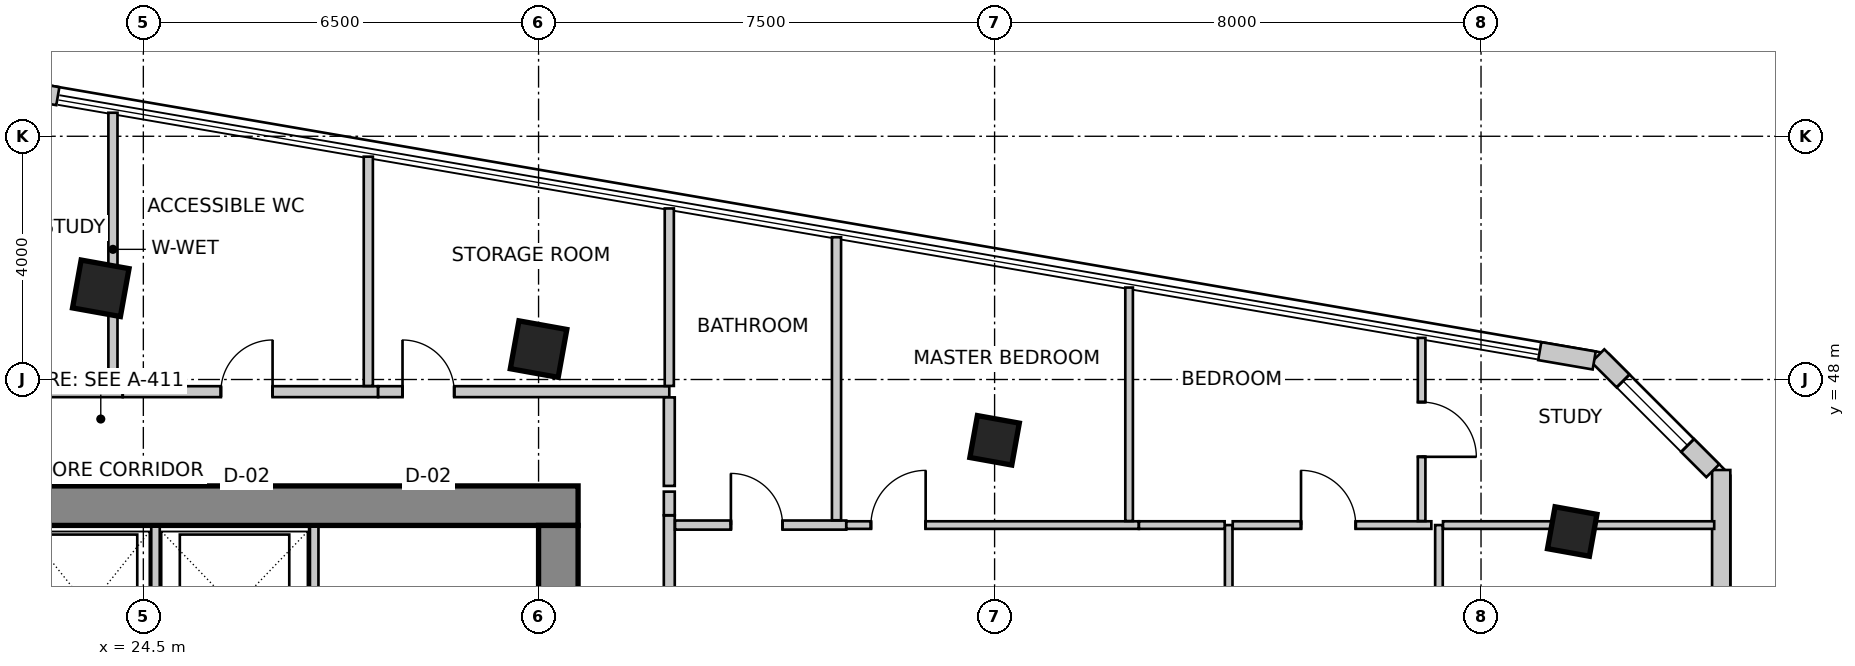
"""IFC4 building model, lengths in metres.
Left out: names, types, materials, properties, quantities, classifications, styles, units other than length and angle.
Written with IfcOpenShell. Run it as: python <this file> out.ifc"""

import sys

from ifc_helpers import new_model, si_unit, direction, frame, frame_2d, origin, origin_2d, place, context, subcontext, project, spatial, rectangle, extrude, source, transform, mapped, element, fill, save


model = new_model("IFC4")
c1 = context("Model", 3, precision=1e-05, world=origin(), true_north=direction((0.0, 1.0)))
c2 = subcontext(c1, "Body", "Model", "MODEL_VIEW")
j1 = project(units=[si_unit("LENGTHUNIT", "METRE"), si_unit("PLANEANGLEUNIT", "RADIAN")], contexts=[c1])
p1 = place(None, origin())
s1 = spatial("IfcSite", under=j1, at=p1, CompositionType="ELEMENT")
p2 = place(p1, origin())
s2 = spatial("IfcBuilding", under=s1, at=p2, CompositionType="ELEMENT")
p3 = place(p2, frame((0.0, 0.0, 186.9)))
s3 = spatial("IfcBuildingStorey", under=s2, at=p3, CompositionType="ELEMENT", Elevation=186.9)
p4 = place(p3, frame((15.95, 45.925, 0.0), z_axis=(0.0, 0.0, 1.0), x_axis=(1.0, 0.0, 0.0)))
e1 = element("IfcWall", 1, at=p4, inside=s3, PredefinedType="SHEAR", context=c2, shape_type="SweptSolid", body=[
    extrude(rectangle(XDim=15.7, YDim=0.65, at=frame_2d((7.85, 0.0))), origin(), (0.0, 0.0, 1.0), 3.5),
])
p5 = place(p3, frame((31.325, 34.2, 0.0), z_axis=(0.0, 0.0, 1.0), x_axis=(0.0, 1.0, 0.0)))
e2 = element("IfcWall", 2, at=p5, inside=s3, PredefinedType="SHEAR", context=c2, shape_type="SweptSolid", body=[
    extrude(rectangle(XDim=11.4, YDim=0.65, at=frame_2d((5.7, 0.0))), origin(), (0.0, 0.0, 1.0), 3.5),
])
m1 = source(origin(), c2, "Body", "SweptSolid", [
    extrude(rectangle(XDim=1.1, YDim=2.15, at=frame_2d((0.55, 1.075))), frame((0.0, 0.335, 0.0), z_axis=(0.0, -1.0, 0.0), x_axis=(1.0, 0.0, 0.0)), (0.0, 0.0, 1.0), 0.67),
])
p6 = place(p5, frame((7.35, 0.0, 0.0)))
e3 = element("IfcOpeningElement", 3, at=p6, cuts=e2, PredefinedType="OPENING", context=c2, shape_type="MappedRepresentation", body=[
    mapped(m1, transform((0.0, 0.0, 0.0), scale=1.0)),
])
m2 = source(origin(), c2, "Body", "SweptSolid", [
    extrude(rectangle(XDim=0.8, YDim=0.8, at=origin_2d()), origin(), (0.0, 0.0, 1.0), 3.5),
])
for number, where, z_axis, x_axis in (
    (4, (23.8, 49.5, 0.0), (0.0, 0.0, 1.0), (0.984, -0.177, 0.0)),
    (5, (31.0, 48.5, 0.0), (0.0, 0.0, 1.0), (0.984, -0.177, 0.0)),
):
    element("IfcColumn", number, at=place(p3, frame(where, z_axis=z_axis, x_axis=x_axis)), inside=s3, PredefinedType="COLUMN", context=c2, shape_type="MappedRepresentation", body=[
        mapped(m2, transform((0.0, 0.0, 0.0), scale=1.0)),
    ])
m3 = source(origin(), c2, "Body", "SweptSolid", [
    extrude(rectangle(XDim=0.7, YDim=0.7, at=origin_2d()), origin(), (0.0, 0.0, 1.0), 3.5),
])
for number, where, z_axis, x_axis in (
    (6, (38.5, 47.0, 0.0), (0.0, 0.0, 1.0), (0.984, -0.177, 0.0)),
    (7, (48.0, 45.5, 0.0), (0.0, 0.0, 1.0), (0.984, -0.177, 0.0)),
):
    element("IfcColumn", number, at=place(p3, frame(where, z_axis=z_axis, x_axis=x_axis)), inside=s3, PredefinedType="COLUMN", context=c2, shape_type="MappedRepresentation", body=[
        mapped(m3, transform((0.0, 0.0, 0.0), scale=1.0)),
    ])
p7 = place(p3, frame((50.45, 35.781, 0.0), z_axis=(0.0, 0.0, 1.0), x_axis=(0.0, 1.0, 0.0)))
e8 = element("IfcWall", 8, at=p7, inside=s3, PredefinedType="SOLIDWALL", context=c2, shape_type="SweptSolid", body=[
    extrude(rectangle(XDim=10.731, YDim=0.3, at=frame_2d((5.365, 0.0))), origin(), (0.0, 0.0, 1.0), 3.25),
])
m4 = source(origin(), c2, "Body", "SweptSolid", [
    extrude(rectangle(XDim=2.4, YDim=2.2, at=frame_2d((1.2, 1.1))), frame((0.0, 0.16, 0.0), z_axis=(0.0, -1.0, 0.0), x_axis=(1.0, 0.0, 0.0)), (0.0, 0.0, 1.0), 0.32),
])
p8 = place(p7, frame((1.441, 0.0, 0.85)))
e9 = element("IfcOpeningElement", 9, at=p8, cuts=e8, PredefinedType="OPENING", context=c2, shape_type="MappedRepresentation", body=[
    mapped(m4, transform((0.0, 0.0, 0.0), scale=1.0)),
])
m5 = source(origin(), c2, "Body", "SweptSolid", [
    extrude(rectangle(XDim=2.1, YDim=2.0, at=frame_2d((1.05, 1.0))), frame((0.0, 0.16, 0.0), z_axis=(0.0, -1.0, 0.0), x_axis=(1.0, 0.0, 0.0)), (0.0, 0.0, 1.0), 0.32),
])
p9 = place(p7, frame((6.234, 0.0, 0.85)))
e10 = element("IfcOpeningElement", 10, at=p9, cuts=e8, PredefinedType="OPENING", context=c2, shape_type="MappedRepresentation", body=[
    mapped(m5, transform((0.0, 0.0, 0.0), scale=1.0)),
])
p10 = place(p3, frame((50.312, 46.5, 0.0), z_axis=(0.0, 0.0, 1.0), x_axis=(-0.707106781187, 0.707106781187, 0.0)))
e11 = element("IfcWall", 11, at=p10, inside=s3, PredefinedType="SOLIDWALL", context=c2, shape_type="SweptSolid", body=[
    extrude(rectangle(XDim=2.673, YDim=0.3, at=frame_2d((1.337, 0.0))), origin(), (0.0, 0.0, 1.0), 3.25),
])
m6 = source(origin(), c2, "Body", "SweptSolid", [
    extrude(rectangle(XDim=1.5, YDim=1.8, at=frame_2d((0.75, 0.9))), frame((0.0, 0.16, 0.0), z_axis=(0.0, -1.0, 0.0), x_axis=(1.0, 0.0, 0.0)), (0.0, 0.0, 1.0), 0.32),
])
p11 = place(p10, frame((0.587, 0.0, 0.85)))
e12 = element("IfcOpeningElement", 12, at=p11, cuts=e11, PredefinedType="OPENING", context=c2, shape_type="MappedRepresentation", body=[
    mapped(m6, transform((0.0, 0.0, 0.0), scale=1.0)),
])
p12 = place(p3, frame((48.361, 48.313, 0.0), z_axis=(0.0, 0.0, 1.0), x_axis=(-0.985560806516, 0.169321872949, 0.0)))
e13 = element("IfcWall", 13, at=p12, inside=s3, PredefinedType="SOLIDWALL", context=c2, shape_type="SweptSolid", body=[
    extrude(rectangle(XDim=0.908, YDim=0.3, at=frame_2d((0.454, 0.0))), origin(), (0.0, 0.0, 1.0), 3.25),
])
p13 = place(p3, frame((23.094, 52.66, 0.0), z_axis=(0.0, 0.0, 1.0), x_axis=(-0.985503719785, 0.169653818966, 0.0)))
e14 = element("IfcWall", 14, at=p13, inside=s3, PredefinedType="SOLIDWALL", context=c2, shape_type="SweptSolid", body=[
    extrude(rectangle(XDim=1.228, YDim=0.3, at=frame_2d((0.614, 0.0))), origin(), (0.0, 0.0, 1.0), 3.25),
])
p14 = place(p3, frame((27.31, 43.28, 0.0), z_axis=(0.0, 0.0, 1.0), x_axis=(0.0, 1.0, 0.0)))
e15 = element("IfcWall", 15, at=p14, inside=s3, PredefinedType="SOLIDWALL", context=c2, shape_type="SweptSolid", body=[
    extrude(rectangle(XDim=2.3, YDim=0.14, at=frame_2d((1.15, 0.0))), origin(), (0.0, 0.0, 1.0), 3.25),
])
p15 = place(p3, frame((24.7, 43.02, 0.0), z_axis=(0.0, 0.0, 1.0), x_axis=(0.0, 1.0, 0.0)))
e16 = element("IfcWall", 16, at=p15, inside=s3, PredefinedType="SOLIDWALL", context=c2, shape_type="SweptSolid", body=[
    extrude(rectangle(XDim=2.56, YDim=0.14, at=frame_2d((1.28, 0.0))), origin(), (0.0, 0.0, 1.0), 3.25),
])
p16 = place(p3, frame((14.453, 47.8, 0.0), z_axis=(0.0, 0.0, 1.0), x_axis=(1.0, 0.0, 0.0)))
e17 = element("IfcWall", 17, at=p16, inside=s3, PredefinedType="PARTITIONING", context=c2, shape_type="SweptSolid", body=[
    extrude(rectangle(XDim=9.707, YDim=0.18, at=frame_2d((4.854, 0.0))), origin(), (0.0, 0.0, 1.0), 2.919),
])
m7 = source(origin(), c2, "Body", "SweptSolid", [
    extrude(rectangle(XDim=0.9, YDim=2.15, at=frame_2d((0.45, 1.075))), frame((0.0, 0.1, 0.0), z_axis=(0.0, -1.0, 0.0), x_axis=(1.0, 0.0, 0.0)), (0.0, 0.0, 1.0), 0.2),
])
p17 = place(p16, frame((4.404, 0.0, 0.0)))
e18 = element("IfcOpeningElement", 18, at=p17, cuts=e17, PredefinedType="OPENING", context=c2, shape_type="MappedRepresentation", body=[
    mapped(m7, transform((0.0, 0.0, 0.0), scale=1.0)),
])
p18 = place(p3, frame((24.162, 47.8, 0.0), z_axis=(0.0, 0.0, 1.0), x_axis=(1.0, 0.0, 0.0)))
e19 = element("IfcWall", 19, at=p18, inside=s3, PredefinedType="PARTITIONING", context=c2, shape_type="SweptSolid", body=[
    extrude(rectangle(XDim=4.198, YDim=0.18, at=frame_2d((2.099, 0.0))), origin(), (0.0, 0.0, 1.0), 3.25),
])
m8 = source(origin(), c2, "Body", "SweptSolid", [
    extrude(rectangle(XDim=0.85, YDim=2.15, at=frame_2d((0.425, 1.075))), frame((0.0, 0.1, 0.0), z_axis=(0.0, -1.0, 0.0), x_axis=(1.0, 0.0, 0.0)), (0.0, 0.0, 1.0), 0.2),
])
p19 = place(p18, frame((1.613, 0.0, 0.0)))
e20 = element("IfcOpeningElement", 20, at=p19, cuts=e19, PredefinedType="OPENING", context=c2, shape_type="MappedRepresentation", body=[
    mapped(m8, transform((0.0, 0.0, 0.0), scale=1.0)),
])
p20 = place(p3, frame((28.362, 47.8, 0.0), z_axis=(0.0, 0.0, 1.0), x_axis=(1.0, 0.0, 0.0)))
e21 = element("IfcWall", 21, at=p20, inside=s3, PredefinedType="PARTITIONING", context=c2, shape_type="SweptSolid", body=[
    extrude(rectangle(XDim=4.788, YDim=0.18, at=frame_2d((2.394, 0.0))), origin(), (0.0, 0.0, 1.0), 2.779),
])
p21 = place(p20, frame((0.401, 0.0, 0.0)))
e22 = element("IfcOpeningElement", 22, at=p21, cuts=e21, PredefinedType="OPENING", context=c2, shape_type="MappedRepresentation", body=[
    mapped(m8, transform((0.0, 0.0, 0.0), scale=1.0)),
])
p22 = place(p3, frame((33.15, 47.706, 0.0), z_axis=(0.0, 0.0, 1.0), x_axis=(0.0, -1.0, 0.0)))
e23 = element("IfcWall", 23, at=p22, inside=s3, PredefinedType="PARTITIONING", context=c2, shape_type="SweptSolid", body=[
    extrude(rectangle(XDim=1.456, YDim=0.18, at=frame_2d((0.728, 0.0))), origin(), (0.0, 0.0, 1.0), 2.779),
])
p23 = place(p3, frame((33.15, 45.766, 0.0), z_axis=(0.0, 0.0, 1.0), x_axis=(0.0, -1.0, 0.0)))
e24 = element("IfcWall", 24, at=p23, inside=s3, PredefinedType="PARTITIONING", context=c2, shape_type="SweptSolid", body=[
    extrude(rectangle(XDim=5.526, YDim=0.18, at=frame_2d((2.763, 0.0))), origin(), (0.0, 0.0, 1.0), 2.779),
])
p24 = place(p3, frame((33.15, 46.156, 0.0), z_axis=(0.0, 0.0, 1.0), x_axis=(0.0, -1.0, 0.0)))
e25 = element("IfcWall", 25, at=p24, inside=s3, PredefinedType="PARTITIONING", context=c2, shape_type="SweptSolid", body=[
    extrude(rectangle(XDim=0.388, YDim=0.18, at=frame_2d((0.194, 0.0))), origin(), (0.0, 0.0, 1.0), 2.919),
])
p25 = place(p3, frame((24.0, 52.387, 0.0), z_axis=(0.0, 0.0, 1.0), x_axis=(0.0, -1.0, 0.0)))
e26 = element("IfcWall", 26, at=p25, inside=s3, PredefinedType="PARTITIONING", context=c2, shape_type="SweptSolid", body=[
    extrude(rectangle(XDim=4.493, YDim=0.15, at=frame_2d((2.247, 0.0))), origin(), (0.0, 0.0, 1.0), 2.542),
])
p26 = place(p3, frame((28.2, 51.665, 0.0), z_axis=(0.0, 0.0, 1.0), x_axis=(0.0, -1.0, 0.0)))
e27 = element("IfcWall", 27, at=p26, inside=s3, PredefinedType="PARTITIONING", context=c2, shape_type="SweptSolid", body=[
    extrude(rectangle(XDim=3.771, YDim=0.15, at=frame_2d((1.885, 0.0))), origin(), (0.0, 0.0, 1.0), 2.542),
])
p27 = place(p3, frame((33.15, 50.813, 0.0), z_axis=(0.0, 0.0, 1.0), x_axis=(0.0, -1.0, 0.0)))
e28 = element("IfcWall", 28, at=p27, inside=s3, PredefinedType="PARTITIONING", context=c2, shape_type="SweptSolid", body=[
    extrude(rectangle(XDim=2.919, YDim=0.15, at=frame_2d((1.459, 0.0))), origin(), (0.0, 0.0, 1.0), 2.542),
])
p28 = place(p3, frame((45.808, 40.494, 0.0), z_axis=(0.0, 0.0, 1.0), x_axis=(0.0, 1.0, 0.0)))
e29 = element("IfcWall", 29, at=p28, inside=s3, PredefinedType="PARTITIONING", context=c2, shape_type="SweptSolid", body=[
    extrude(rectangle(XDim=5.112, YDim=0.125, at=frame_2d((2.556, 0.0))), origin(), (0.0, 0.0, 1.0), 2.779),
])
m9 = source(origin(), c2, "Body", "SweptSolid", [
    extrude(rectangle(XDim=0.9, YDim=2.15, at=frame_2d((0.45, 1.075))), frame((0.0, 0.073, 0.0), z_axis=(0.0, -1.0, 0.0), x_axis=(1.0, 0.0, 0.0)), (0.0, 0.0, 1.0), 0.145),
])
p29 = place(p28, frame((2.106, 0.0, 0.0)))
e30 = element("IfcOpeningElement", 30, at=p29, cuts=e29, PredefinedType="OPENING", context=c2, shape_type="MappedRepresentation", body=[
    mapped(m9, transform((0.0, 0.0, 0.0), scale=1.0)),
])
p30 = place(p3, frame((45.875, 45.606, 0.0), z_axis=(0.0, 0.0, 1.0), x_axis=(1.0, 0.0, 0.0)))
e31 = element("IfcWall", 31, at=p30, inside=s3, PredefinedType="PARTITIONING", context=c2, shape_type="SweptSolid", body=[
    extrude(rectangle(XDim=4.46, YDim=0.125, at=frame_2d((2.23, 0.0))), origin(), (0.0, 0.0, 1.0), 2.542),
])
p31 = place(p3, frame((42.35, 45.606, 0.0), z_axis=(0.0, 0.0, 1.0), x_axis=(0.0, -1.0, 0.0)))
e32 = element("IfcWall", 32, at=p31, inside=s3, PredefinedType="PARTITIONING", context=c2, shape_type="SweptSolid", body=[
    extrude(rectangle(XDim=5.112, YDim=0.125, at=frame_2d((2.556, 0.0))), origin(), (0.0, 0.0, 1.0), 2.919),
])
m10 = source(origin(), c2, "Body", "SweptSolid", [
    extrude(rectangle(XDim=0.85, YDim=2.15, at=frame_2d((0.425, 1.075))), frame((0.0, 0.073, 0.0), z_axis=(0.0, -1.0, 0.0), x_axis=(1.0, 0.0, 0.0)), (0.0, 0.0, 1.0), 0.145),
])
p32 = place(p31, frame((2.131, 0.0, 0.0)))
e33 = element("IfcOpeningElement", 33, at=p32, cuts=e32, PredefinedType="OPENING", context=c2, shape_type="MappedRepresentation", body=[
    mapped(m10, transform((0.0, 0.0, 0.0), scale=1.0)),
])
p33 = place(p3, frame((33.244, 45.606, 0.0), z_axis=(0.0, 0.0, 1.0), x_axis=(1.0, 0.0, 0.0)))
e34 = element("IfcWall", 34, at=p33, inside=s3, PredefinedType="PARTITIONING", context=c2, shape_type="SweptSolid", body=[
    extrude(rectangle(XDim=2.816, YDim=0.15, at=frame_2d((1.408, 0.0))), origin(), (0.0, 0.0, 1.0), 2.779),
])
m11 = source(origin(), c2, "Body", "SweptSolid", [
    extrude(rectangle(XDim=0.85, YDim=2.15, at=frame_2d((0.425, 1.075))), frame((0.0, 0.085, 0.0), z_axis=(0.0, -1.0, 0.0), x_axis=(1.0, 0.0, 0.0)), (0.0, 0.0, 1.0), 0.17),
])
p34 = place(p33, frame((0.919, 0.0, 0.0)))
e35 = element("IfcOpeningElement", 35, at=p34, cuts=e34, PredefinedType="OPENING", context=c2, shape_type="MappedRepresentation", body=[
    mapped(m11, transform((0.0, 0.0, 0.0), scale=1.0)),
])
p35 = place(p3, frame((36.062, 45.606, 0.0), z_axis=(0.0, 0.0, 1.0), x_axis=(1.0, 0.0, 0.0)))
e36 = element("IfcWall", 36, at=p35, inside=s3, PredefinedType="PARTITIONING", context=c2, shape_type="SweptSolid", body=[
    extrude(rectangle(XDim=4.81, YDim=0.125, at=frame_2d((2.405, 0.0))), origin(), (0.0, 0.0, 1.0), 2.766),
])
p36 = place(p35, frame((0.404, 0.0, 0.0)))
e37 = element("IfcOpeningElement", 37, at=p36, cuts=e36, PredefinedType="OPENING", context=c2, shape_type="MappedRepresentation", body=[
    mapped(m9, transform((0.0, 0.0, 0.0), scale=1.0)),
])
p37 = place(p3, frame((40.874, 45.606, 0.0), z_axis=(0.0, 0.0, 1.0), x_axis=(1.0, 0.0, 0.0)))
e38 = element("IfcWall", 38, at=p37, inside=s3, PredefinedType="PARTITIONING", context=c2, shape_type="SweptSolid", body=[
    extrude(rectangle(XDim=1.409, YDim=0.125, at=frame_2d((0.705, 0.0))), origin(), (0.0, 0.0, 1.0), 3.25),
])
p38 = place(p3, frame((42.417, 45.606, 0.0), z_axis=(0.0, 0.0, 1.0), x_axis=(1.0, 0.0, 0.0)))
e39 = element("IfcWall", 39, at=p38, inside=s3, PredefinedType="PARTITIONING", context=c2, shape_type="SweptSolid", body=[
    extrude(rectangle(XDim=3.267, YDim=0.125, at=frame_2d((1.633, 0.0))), origin(), (0.0, 0.0, 1.0), 3.25),
])
p39 = place(p38, frame((1.123, 0.0, 0.0)))
e40 = element("IfcOpeningElement", 40, at=p39, cuts=e39, PredefinedType="OPENING", context=c2, shape_type="MappedRepresentation", body=[
    mapped(m9, transform((0.0, 0.0, 0.0), scale=1.0)),
])
p40 = place(p3, frame((35.9, 50.34, 0.0), z_axis=(0.0, 0.0, 1.0), x_axis=(0.0, -1.0, 0.0)))
e41 = element("IfcWall", 41, at=p40, inside=s3, PredefinedType="PARTITIONING", context=c2, shape_type="SweptSolid", body=[
    extrude(rectangle(XDim=4.655, YDim=0.15, at=frame_2d((2.327, 0.0))), origin(), (0.0, 0.0, 1.0), 2.542),
])
p41 = place(p3, frame((40.712, 49.512, 0.0), z_axis=(0.0, 0.0, 1.0), x_axis=(0.0, -1.0, 0.0)))
e42 = element("IfcWall", 42, at=p41, inside=s3, PredefinedType="PARTITIONING", context=c2, shape_type="SweptSolid", body=[
    extrude(rectangle(XDim=3.84, YDim=0.125, at=frame_2d((1.92, 0.0))), origin(), (0.0, 0.0, 1.0), 2.542),
])
p42 = place(p3, frame((45.523, 48.684, 0.0), z_axis=(0.0, 0.0, 1.0), x_axis=(0.0, -1.0, 0.0)))
e43 = element("IfcWall", 43, at=p42, inside=s3, PredefinedType="PARTITIONING", context=c2, shape_type="SweptSolid", body=[
    extrude(rectangle(XDim=3.012, YDim=0.125, at=frame_2d((1.506, 0.0))), origin(), (0.0, 0.0, 1.0), 2.542),
])
p43 = place(p42, frame((1.056, 0.0, 0.0)))
e44 = element("IfcOpeningElement", 44, at=p43, cuts=e43, PredefinedType="OPENING", context=c2, shape_type="MappedRepresentation", body=[
    mapped(m9, transform((0.0, 0.0, 0.0), scale=1.0)),
])
m12 = source(origin(), c2, "Body", "SweptSolid", [
    extrude(rectangle(XDim=1.5, YDim=1.8, at=frame_2d((0.75, 0.9))), frame((0.0, -0.015, 0.0), z_axis=(0.0, -1.0, 0.0), x_axis=(1.0, 0.0, 0.0)), (0.0, 0.0, 1.0), 0.06),
])
p44 = place(p11, origin())
e45 = element("IfcWindow", 45, at=p44, inside=s3, PartitioningType="SINGLE_PANEL", PredefinedType="WINDOW", context=c2, shape_type="MappedRepresentation", body=[
    mapped(m12, transform((0.0, 0.0, 0.0), scale=1.0)),
])
fill(e12, e45)
m13 = source(origin(), c2, "Body", "SweptSolid", [
    extrude(rectangle(XDim=0.85, YDim=2.15, at=frame_2d((0.425, 1.075))), frame((0.0, 0.025, 0.0), z_axis=(0.0, -1.0, 0.0), x_axis=(1.0, 0.0, 0.0)), (0.0, 0.0, 1.0), 0.05),
])
p45 = place(p19, origin())
e46 = element("IfcDoor", 46, at=p45, inside=s3, OperationType="SINGLE_SWING_RIGHT", PredefinedType="DOOR", context=c2, shape_type="MappedRepresentation", body=[
    mapped(m13, transform((0.0, 0.0, 0.0), scale=1.0)),
])
fill(e20, e46)
p46 = place(p21, origin())
e47 = element("IfcDoor", 47, at=p46, inside=s3, OperationType="SINGLE_SWING_LEFT", PredefinedType="DOOR", context=c2, shape_type="MappedRepresentation", body=[
    mapped(m13, transform((0.0, 0.0, 0.0), scale=1.0)),
])
fill(e22, e47)
p47 = place(p34, origin())
e48 = element("IfcDoor", 48, at=p47, inside=s3, OperationType="SINGLE_SWING_LEFT", PredefinedType="DOOR", context=c2, shape_type="MappedRepresentation", body=[
    mapped(m13, transform((0.0, 0.0, 0.0), scale=1.0)),
])
fill(e35, e48)
m14 = source(origin(), c2, "Body", "SweptSolid", [
    extrude(rectangle(XDim=0.9, YDim=2.15, at=frame_2d((0.45, 1.075))), frame((0.0, 0.025, 0.0), z_axis=(0.0, -1.0, 0.0), x_axis=(1.0, 0.0, 0.0)), (0.0, 0.0, 1.0), 0.05),
])
p48 = place(p36, origin())
e49 = element("IfcDoor", 49, at=p48, inside=s3, OperationType="SINGLE_SWING_RIGHT", PredefinedType="DOOR", context=c2, shape_type="MappedRepresentation", body=[
    mapped(m14, transform((0.0, 0.0, 0.0), scale=1.0)),
])
fill(e37, e49)
p49 = place(p39, origin())
e50 = element("IfcDoor", 50, at=p49, inside=s3, OperationType="SINGLE_SWING_LEFT", PredefinedType="DOOR", context=c2, shape_type="MappedRepresentation", body=[
    mapped(m14, transform((0.0, 0.0, 0.0), scale=1.0)),
])
fill(e40, e50)
p50 = place(p43, origin())
e51 = element("IfcDoor", 51, at=p50, inside=s3, OperationType="SINGLE_SWING_RIGHT", PredefinedType="DOOR", context=c2, shape_type="MappedRepresentation", body=[
    mapped(m14, transform((0.0, 0.0, 0.0), scale=1.0)),
])
fill(e44, e51)
save(model, sys.argv[1])
